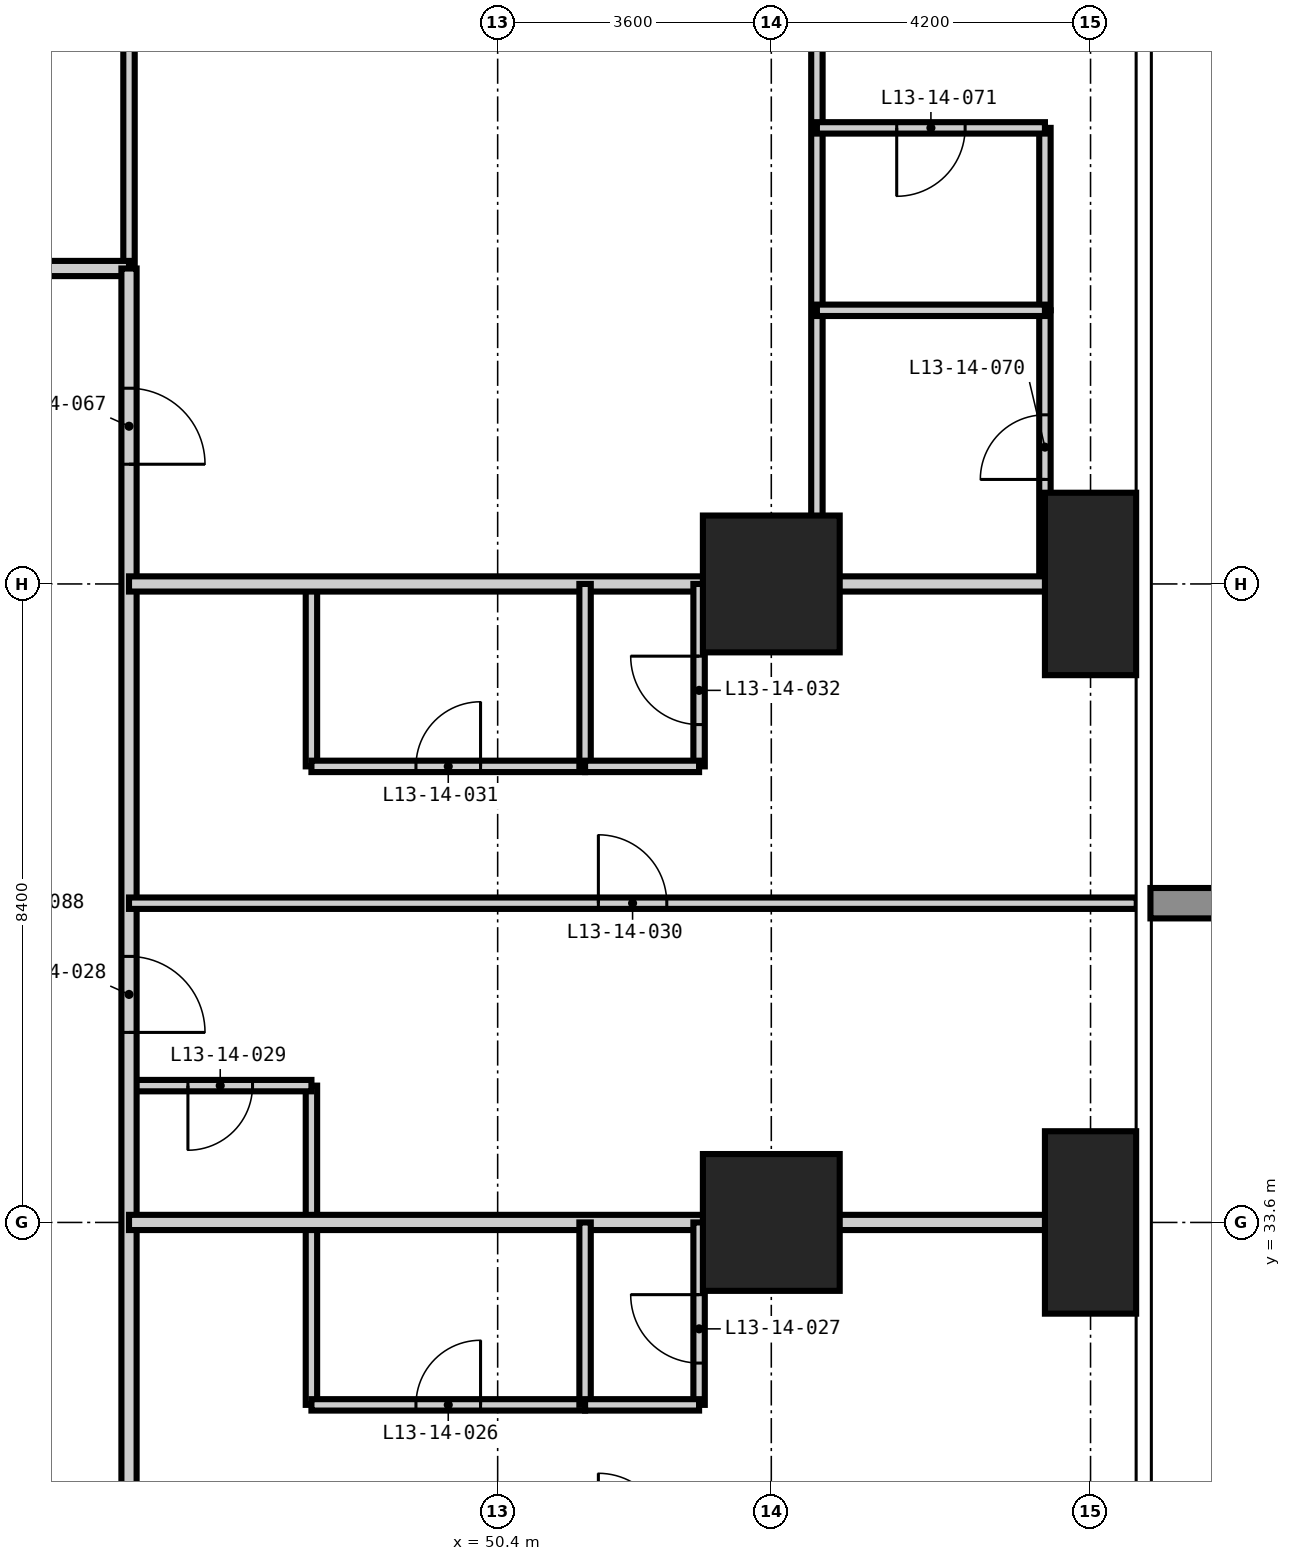
"""IFC4 building model, lengths in metres.
Left out: names, types, materials, properties, quantities, classifications, styles, units other than length and angle.
Written with IfcOpenShell. Run it as: python <this file> out.ifc"""

import sys

from ifc_helpers import new_model, si_unit, direction, frame, frame_2d, origin, origin_2d, place, context, subcontext, project, spatial, rectangle, extrude, element, fill, save


model = new_model("IFC4")
c1 = context("Model", 3, precision=1e-05, world=origin(), true_north=direction((0.0, 1.0)))
c2 = subcontext(c1, "Body", "Model", "MODEL_VIEW")
j1 = project(units=[si_unit("LENGTHUNIT", "METRE"), si_unit("PLANEANGLEUNIT", "RADIAN")], contexts=[c1])
p1 = place(None, origin())
s1 = spatial("IfcSite", under=j1, at=p1, CompositionType="ELEMENT")
p2 = place(p1, origin())
s2 = spatial("IfcBuilding", under=s1, at=p2, CompositionType="ELEMENT")
p3 = place(p2, frame((0.0, 0.0, 55.8)))
s3 = spatial("IfcBuildingStorey", under=s2, at=p3, CompositionType="ELEMENT", Elevation=55.8)
for number, where, z_axis, x_axis in (
    (1, (54.0, 33.6, -0.35), (0.0, 0.0, 1.0), (1.0, 0.0, 0.0)),
    (2, (54.0, 42.0, -0.35), (0.0, 0.0, 1.0), (1.0, 0.0, 0.0)),
):
    element("IfcColumn", number, at=place(p3, frame(where, z_axis=z_axis, x_axis=x_axis)), inside=s3, PredefinedType="COLUMN", context=c2, shape_type="SweptSolid", body=[
        extrude(rectangle(XDim=1.8, YDim=1.8, at=origin_2d()), origin(), (0.0, 0.0, 1.0), 3.6),
    ])
for number, where, z_axis, x_axis in (
    (3, (58.2, 33.6, -0.35), (0.0, 0.0, 1.0), (1.0, 0.0, 0.0)),
    (4, (58.2, 42.0, -0.35), (0.0, 0.0, 1.0), (1.0, 0.0, 0.0)),
):
    element("IfcColumn", number, at=place(p3, frame(where, z_axis=z_axis, x_axis=x_axis)), inside=s3, PredefinedType="COLUMN", context=c2, shape_type="SweptSolid", body=[
        extrude(rectangle(XDim=1.2, YDim=2.4, at=origin_2d()), origin(), (0.0, 0.0, 1.0), 3.6),
    ])
p4 = place(p3, frame((45.55, 46.15, 0.0), z_axis=(0.0, 0.0, 1.0), x_axis=(0.0, 1.0, 0.0)))
e5 = element("IfcWall", 5, at=p4, inside=s3, PredefinedType="PARTITIONING", context=c2, shape_type="SweptSolid", body=[
    extrude(rectangle(XDim=3.0, YDim=0.15, at=frame_2d((1.5, 0.0))), origin(), (0.0, 0.0, 1.0), 3.25),
])
p5 = place(p3, frame((47.95, 31.2, 0.0), z_axis=(0.0, 0.0, 1.0), x_axis=(0.0, 1.0, 0.0)))
e6 = element("IfcWall", 6, at=p5, inside=s3, PredefinedType="PARTITIONING", context=c2, shape_type="SweptSolid", body=[
    extrude(rectangle(XDim=4.2, YDim=0.15, at=frame_2d((2.1, 0.0))), origin(), (0.0, 0.0, 1.0), 3.25),
])
p6 = place(p3, frame((47.95, 39.6, 0.0), z_axis=(0.0, 0.0, 1.0), x_axis=(0.0, 1.0, 0.0)))
e7 = element("IfcWall", 7, at=p6, inside=s3, PredefinedType="PARTITIONING", context=c2, shape_type="SweptSolid", body=[
    extrude(rectangle(XDim=2.4, YDim=0.15, at=frame_2d((1.2, 0.0))), origin(), (0.0, 0.0, 1.0), 3.25),
])
p7 = place(p3, frame((57.6, 42.0, 0.0), z_axis=(0.0, 0.0, 1.0), x_axis=(0.0, 1.0, 0.0)))
e8 = element("IfcWall", 8, at=p7, inside=s3, PredefinedType="PARTITIONING", context=c2, shape_type="SweptSolid", body=[
    extrude(rectangle(XDim=3.6, YDim=0.15, at=frame_2d((1.8, 0.0))), origin(), (0.0, 0.0, 1.0), 3.25),
])
p8 = place(p7, frame((1.375, 0.0, 0.0)))
e9 = element("IfcOpeningElement", 9, at=p8, cuts=e8, PredefinedType="OPENING", context=c2, shape_type="SweptSolid", body=[
    extrude(rectangle(XDim=0.85, YDim=2.1, at=frame_2d((0.425, 1.05))), frame((0.0, 0.085, 0.0), z_axis=(0.0, -1.0, 0.0), x_axis=(1.0, 0.0, 0.0)), (0.0, 0.0, 1.0), 0.17),
])
p9 = place(p3, frame((47.95, 31.2, 0.0), z_axis=(0.0, 0.0, 1.0), x_axis=(1.0, 0.0, 0.0)))
e10 = element("IfcWall", 10, at=p9, inside=s3, PredefinedType="PARTITIONING", context=c2, shape_type="SweptSolid", body=[
    extrude(rectangle(XDim=3.6, YDim=0.15, at=frame_2d((1.8, 0.0))), origin(), (0.0, 0.0, 1.0), 3.25),
])
p10 = place(p9, frame((1.375, 0.0, 0.0)))
e11 = element("IfcOpeningElement", 11, at=p10, cuts=e10, PredefinedType="OPENING", context=c2, shape_type="SweptSolid", body=[
    extrude(rectangle(XDim=0.85, YDim=2.1, at=frame_2d((0.425, 1.05))), frame((0.0, 0.085, 0.0), z_axis=(0.0, -1.0, 0.0), x_axis=(1.0, 0.0, 0.0)), (0.0, 0.0, 1.0), 0.17),
])
p11 = place(p3, frame((45.55, 35.4, 0.0), z_axis=(0.0, 0.0, 1.0), x_axis=(1.0, 0.0, 0.0)))
e12 = element("IfcWall", 12, at=p11, inside=s3, PredefinedType="PARTITIONING", context=c2, shape_type="SweptSolid", body=[
    extrude(rectangle(XDim=2.4, YDim=0.15, at=frame_2d((1.2, 0.0))), origin(), (0.0, 0.0, 1.0), 3.25),
])
p12 = place(p11, frame((0.775, 0.0, 0.0)))
e13 = element("IfcOpeningElement", 13, at=p12, cuts=e12, PredefinedType="OPENING", context=c2, shape_type="SweptSolid", body=[
    extrude(rectangle(XDim=0.85, YDim=2.1, at=frame_2d((0.425, 1.05))), frame((0.0, 0.085, 0.0), z_axis=(0.0, -1.0, 0.0), x_axis=(1.0, 0.0, 0.0)), (0.0, 0.0, 1.0), 0.17),
])
p13 = place(p3, frame((47.95, 39.6, 0.0), z_axis=(0.0, 0.0, 1.0), x_axis=(1.0, 0.0, 0.0)))
e14 = element("IfcWall", 14, at=p13, inside=s3, PredefinedType="PARTITIONING", context=c2, shape_type="SweptSolid", body=[
    extrude(rectangle(XDim=3.6, YDim=0.15, at=frame_2d((1.8, 0.0))), origin(), (0.0, 0.0, 1.0), 3.25),
])
p14 = place(p13, frame((1.375, 0.0, 0.0)))
e15 = element("IfcOpeningElement", 15, at=p14, cuts=e14, PredefinedType="OPENING", context=c2, shape_type="SweptSolid", body=[
    extrude(rectangle(XDim=0.85, YDim=2.1, at=frame_2d((0.425, 1.05))), frame((0.0, 0.085, 0.0), z_axis=(0.0, -1.0, 0.0), x_axis=(1.0, 0.0, 0.0)), (0.0, 0.0, 1.0), 0.17),
])
p15 = place(p3, frame((13.85, 46.15, 0.0), z_axis=(0.0, 0.0, 1.0), x_axis=(1.0, 0.0, 0.0)))
e16 = element("IfcWall", 16, at=p15, inside=s3, PredefinedType="PARTITIONING", context=c2, shape_type="SweptSolid", body=[
    extrude(rectangle(XDim=31.7, YDim=0.2, at=frame_2d((15.85, 0.0))), origin(), (0.0, 0.0, 1.0), 3.25),
])
p16 = place(p15, frame((6.65, 0.0, 0.0)))
e17 = element("IfcOpeningElement", 17, at=p16, cuts=e16, PredefinedType="OPENING", context=c2, shape_type="SweptSolid", body=[
    extrude(rectangle(XDim=1.0, YDim=2.2, at=frame_2d((0.5, 1.1))), frame((0.0, 0.11, 0.0), z_axis=(0.0, -1.0, 0.0), x_axis=(1.0, 0.0, 0.0)), (0.0, 0.0, 1.0), 0.22),
])
p17 = place(p15, frame((15.05, 0.0, 0.0)))
e18 = element("IfcOpeningElement", 18, at=p17, cuts=e16, PredefinedType="OPENING", context=c2, shape_type="SweptSolid", body=[
    extrude(rectangle(XDim=1.0, YDim=2.2, at=frame_2d((0.5, 1.1))), frame((0.0, 0.11, 0.0), z_axis=(0.0, -1.0, 0.0), x_axis=(1.0, 0.0, 0.0)), (0.0, 0.0, 1.0), 0.22),
])
p18 = place(p15, frame((23.45, 0.0, 0.0)))
e19 = element("IfcOpeningElement", 19, at=p18, cuts=e16, PredefinedType="OPENING", context=c2, shape_type="SweptSolid", body=[
    extrude(rectangle(XDim=1.0, YDim=2.2, at=frame_2d((0.5, 1.1))), frame((0.0, 0.11, 0.0), z_axis=(0.0, -1.0, 0.0), x_axis=(1.0, 0.0, 0.0)), (0.0, 0.0, 1.0), 0.22),
])
p19 = place(p3, frame((45.55, 46.15, 0.0), z_axis=(0.0, 0.0, 1.0), x_axis=(0.0, -1.0, 0.0)))
e20 = element("IfcWall", 20, at=p19, inside=s3, PredefinedType="PARTITIONING", context=c2, shape_type="SweptSolid", body=[
    extrude(rectangle(XDim=32.3, YDim=0.2, at=frame_2d((16.15, 0.0))), origin(), (0.0, 0.0, 1.0), 3.25),
])
p20 = place(p19, frame((25.85, 0.0, 0.0)))
e21 = element("IfcOpeningElement", 21, at=p20, cuts=e20, PredefinedType="OPENING", context=c2, shape_type="SweptSolid", body=[
    extrude(rectangle(XDim=1.0, YDim=2.2, at=frame_2d((0.5, 1.1))), frame((0.0, 0.11, 0.0), z_axis=(0.0, -1.0, 0.0), x_axis=(1.0, 0.0, 0.0)), (0.0, 0.0, 1.0), 0.22),
])
p21 = place(p19, frame((17.45, 0.0, 0.0)))
e22 = element("IfcOpeningElement", 22, at=p21, cuts=e20, PredefinedType="OPENING", context=c2, shape_type="SweptSolid", body=[
    extrude(rectangle(XDim=1.0, YDim=2.2, at=frame_2d((0.5, 1.1))), frame((0.0, 0.11, 0.0), z_axis=(0.0, -1.0, 0.0), x_axis=(1.0, 0.0, 0.0)), (0.0, 0.0, 1.0), 0.22),
])
p22 = place(p19, frame((9.05, 0.0, 0.0)))
e23 = element("IfcOpeningElement", 23, at=p22, cuts=e20, PredefinedType="OPENING", context=c2, shape_type="SweptSolid", body=[
    extrude(rectangle(XDim=1.0, YDim=2.2, at=frame_2d((0.5, 1.1))), frame((0.0, 0.11, 0.0), z_axis=(0.0, -1.0, 0.0), x_axis=(1.0, 0.0, 0.0)), (0.0, 0.0, 1.0), 0.22),
])
p23 = place(p19, frame((30.325, 0.0, 0.0)))
e24 = element("IfcOpeningElement", 24, at=p23, cuts=e20, PredefinedType="OPENING", context=c2, shape_type="SweptSolid", body=[
    extrude(rectangle(XDim=1.0, YDim=2.2, at=frame_2d((0.5, 1.1))), frame((0.0, 0.11, 0.0), z_axis=(0.0, -1.0, 0.0), x_axis=(1.0, 0.0, 0.0)), (0.0, 0.0, 1.0), 0.22),
])
p24 = place(p19, frame((1.575, 0.0, 0.0)))
e25 = element("IfcOpeningElement", 25, at=p24, cuts=e20, PredefinedType="OPENING", context=c2, shape_type="SweptSolid", body=[
    extrude(rectangle(XDim=1.0, YDim=2.2, at=frame_2d((0.5, 1.1))), frame((0.0, 0.11, 0.0), z_axis=(0.0, -1.0, 0.0), x_axis=(1.0, 0.0, 0.0)), (0.0, 0.0, 1.0), 0.22),
])
for number, where, z_axis, x_axis in (
    (26, (45.55, 33.6, 0.0), (0.0, 0.0, 1.0), (1.0, 0.0, 0.0)),
    (27, (45.55, 42.0, 0.0), (0.0, 0.0, 1.0), (1.0, 0.0, 0.0)),
):
    element("IfcWall", number, at=place(p3, frame(where, z_axis=z_axis, x_axis=x_axis)), inside=s3, PredefinedType="PARTITIONING", context=c2, shape_type="SweptSolid", body=[
        extrude(rectangle(XDim=13.258, YDim=0.2, at=frame_2d((6.629, 0.0))), origin(), (0.0, 0.0, 1.0), 3.25),
    ])
p25 = place(p3, frame((51.55, 31.2, 0.0), z_axis=(0.0, 0.0, 1.0), x_axis=(0.0, 1.0, 0.0)))
e28 = element("IfcWall", 28, at=p25, inside=s3, PredefinedType="PARTITIONING", context=c2, shape_type="SweptSolid", body=[
    extrude(rectangle(XDim=2.4, YDim=0.15, at=frame_2d((1.2, 0.0))), origin(), (0.0, 0.0, 1.0), 3.25),
])
p26 = place(p3, frame((51.55, 39.6, 0.0), z_axis=(0.0, 0.0, 1.0), x_axis=(0.0, 1.0, 0.0)))
e29 = element("IfcWall", 29, at=p26, inside=s3, PredefinedType="PARTITIONING", context=c2, shape_type="SweptSolid", body=[
    extrude(rectangle(XDim=2.4, YDim=0.15, at=frame_2d((1.2, 0.0))), origin(), (0.0, 0.0, 1.0), 3.25),
])
p27 = place(p3, frame((53.05, 31.2, 0.0), z_axis=(0.0, 0.0, 1.0), x_axis=(0.0, 1.0, 0.0)))
e30 = element("IfcWall", 30, at=p27, inside=s3, PredefinedType="PARTITIONING", context=c2, shape_type="SweptSolid", body=[
    extrude(rectangle(XDim=2.4, YDim=0.15, at=frame_2d((1.2, 0.0))), origin(), (0.0, 0.0, 1.0), 3.25),
])
p28 = place(p27, frame((0.55, 0.0, 0.0)))
e31 = element("IfcOpeningElement", 31, at=p28, cuts=e30, PredefinedType="OPENING", context=c2, shape_type="SweptSolid", body=[
    extrude(rectangle(XDim=0.9, YDim=2.1, at=frame_2d((0.45, 1.05))), frame((0.0, 0.085, 0.0), z_axis=(0.0, -1.0, 0.0), x_axis=(1.0, 0.0, 0.0)), (0.0, 0.0, 1.0), 0.17),
])
p29 = place(p3, frame((53.05, 39.6, 0.0), z_axis=(0.0, 0.0, 1.0), x_axis=(0.0, 1.0, 0.0)))
e32 = element("IfcWall", 32, at=p29, inside=s3, PredefinedType="PARTITIONING", context=c2, shape_type="SweptSolid", body=[
    extrude(rectangle(XDim=2.4, YDim=0.15, at=frame_2d((1.2, 0.0))), origin(), (0.0, 0.0, 1.0), 3.25),
])
p30 = place(p29, frame((0.55, 0.0, 0.0)))
e33 = element("IfcOpeningElement", 33, at=p30, cuts=e32, PredefinedType="OPENING", context=c2, shape_type="SweptSolid", body=[
    extrude(rectangle(XDim=0.9, YDim=2.1, at=frame_2d((0.45, 1.05))), frame((0.0, 0.085, 0.0), z_axis=(0.0, -1.0, 0.0), x_axis=(1.0, 0.0, 0.0)), (0.0, 0.0, 1.0), 0.17),
])
p31 = place(p3, frame((54.6, 42.0, 0.0), z_axis=(0.0, 0.0, 1.0), x_axis=(0.0, 1.0, 0.0)))
e34 = element("IfcWall", 34, at=p31, inside=s3, PredefinedType="PARTITIONING", context=c2, shape_type="SweptSolid", body=[
    extrude(rectangle(XDim=16.808, YDim=0.15, at=frame_2d((8.404, 0.0))), origin(), (0.0, 0.0, 1.0), 3.25),
])
p32 = place(p31, frame((10.95, 0.0, 0.0)))
e35 = element("IfcOpeningElement", 35, at=p32, cuts=e34, PredefinedType="OPENING", context=c2, shape_type="SweptSolid", body=[
    extrude(rectangle(XDim=0.9, YDim=2.1, at=frame_2d((0.45, 1.05))), frame((0.0, 0.085, 0.0), z_axis=(0.0, -1.0, 0.0), x_axis=(1.0, 0.0, 0.0)), (0.0, 0.0, 1.0), 0.17),
])
p33 = place(p3, frame((57.6, 45.6, 0.0), z_axis=(0.0, 0.0, 1.0), x_axis=(0.0, 1.0, 0.0)))
e36 = element("IfcWall", 36, at=p33, inside=s3, PredefinedType="PARTITIONING", context=c2, shape_type="SweptSolid", body=[
    extrude(rectangle(XDim=2.4, YDim=0.15, at=frame_2d((1.2, 0.0))), origin(), (0.0, 0.0, 1.0), 3.25),
])
p34 = place(p3, frame((51.55, 31.2, 0.0), z_axis=(0.0, 0.0, 1.0), x_axis=(1.0, 0.0, 0.0)))
e37 = element("IfcWall", 37, at=p34, inside=s3, PredefinedType="PARTITIONING", context=c2, shape_type="SweptSolid", body=[
    extrude(rectangle(XDim=1.5, YDim=0.15, at=frame_2d((0.75, 0.0))), origin(), (0.0, 0.0, 1.0), 3.25),
])
p35 = place(p3, frame((45.55, 37.8, 0.0), z_axis=(0.0, 0.0, 1.0), x_axis=(1.0, 0.0, 0.0)))
e38 = element("IfcWall", 38, at=p35, inside=s3, PredefinedType="PARTITIONING", context=c2, shape_type="SweptSolid", body=[
    extrude(rectangle(XDim=13.258, YDim=0.15, at=frame_2d((6.629, 0.0))), origin(), (0.0, 0.0, 1.0), 3.25),
])
p36 = place(p35, frame((6.175, 0.0, 0.0)))
e39 = element("IfcOpeningElement", 39, at=p36, cuts=e38, PredefinedType="OPENING", context=c2, shape_type="SweptSolid", body=[
    extrude(rectangle(XDim=0.9, YDim=2.1, at=frame_2d((0.45, 1.05))), frame((0.0, 0.085, 0.0), z_axis=(0.0, -1.0, 0.0), x_axis=(1.0, 0.0, 0.0)), (0.0, 0.0, 1.0), 0.17),
])
p37 = place(p3, frame((51.55, 39.6, 0.0), z_axis=(0.0, 0.0, 1.0), x_axis=(1.0, 0.0, 0.0)))
e40 = element("IfcWall", 40, at=p37, inside=s3, PredefinedType="PARTITIONING", context=c2, shape_type="SweptSolid", body=[
    extrude(rectangle(XDim=1.5, YDim=0.15, at=frame_2d((0.75, 0.0))), origin(), (0.0, 0.0, 1.0), 3.25),
])
p38 = place(p3, frame((54.6, 45.6, 0.0), z_axis=(0.0, 0.0, 1.0), x_axis=(1.0, 0.0, 0.0)))
e41 = element("IfcWall", 41, at=p38, inside=s3, PredefinedType="PARTITIONING", context=c2, shape_type="SweptSolid", body=[
    extrude(rectangle(XDim=3.0, YDim=0.15, at=frame_2d((1.5, 0.0))), origin(), (0.0, 0.0, 1.0), 3.25),
])
p39 = place(p3, frame((54.6, 48.0, 0.0), z_axis=(0.0, 0.0, 1.0), x_axis=(1.0, 0.0, 0.0)))
e42 = element("IfcWall", 42, at=p39, inside=s3, PredefinedType="PARTITIONING", context=c2, shape_type="SweptSolid", body=[
    extrude(rectangle(XDim=3.0, YDim=0.15, at=frame_2d((1.5, 0.0))), origin(), (0.0, 0.0, 1.0), 3.25),
])
p40 = place(p39, frame((1.05, 0.0, 0.0)))
e43 = element("IfcOpeningElement", 43, at=p40, cuts=e42, PredefinedType="OPENING", context=c2, shape_type="SweptSolid", body=[
    extrude(rectangle(XDim=0.9, YDim=2.1, at=frame_2d((0.45, 1.05))), frame((0.0, 0.085, 0.0), z_axis=(0.0, -1.0, 0.0), x_axis=(1.0, 0.0, 0.0)), (0.0, 0.0, 1.0), 0.17),
])
p41 = place(p10, origin())
e44 = element("IfcDoor", 44, at=p41, inside=s3, OperationType="SINGLE_SWING_RIGHT", PredefinedType="DOOR", context=c2, shape_type="SweptSolid", body=[
    extrude(rectangle(XDim=0.85, YDim=2.1, at=frame_2d((0.425, 1.05))), frame((0.0, 0.025, 0.0), z_axis=(0.0, -1.0, 0.0), x_axis=(1.0, 0.0, 0.0)), (0.0, 0.0, 1.0), 0.05),
])
fill(e11, e44)
p42 = place(p28, origin())
e45 = element("IfcDoor", 45, at=p42, inside=s3, OperationType="SINGLE_SWING_RIGHT", PredefinedType="DOOR", context=c2, shape_type="SweptSolid", body=[
    extrude(rectangle(XDim=0.9, YDim=2.1, at=frame_2d((0.45, 1.05))), frame((0.0, 0.025, 0.0), z_axis=(0.0, -1.0, 0.0), x_axis=(1.0, 0.0, 0.0)), (0.0, 0.0, 1.0), 0.05),
])
fill(e31, e45)
p43 = place(p22, origin())
e46 = element("IfcDoor", 46, at=p43, inside=s3, OperationType="SINGLE_SWING_RIGHT", PredefinedType="DOOR", context=c2, shape_type="SweptSolid", body=[
    extrude(rectangle(XDim=1.0, YDim=2.2, at=frame_2d((0.5, 1.1))), frame((0.0, 0.025, 0.0), z_axis=(0.0, -1.0, 0.0), x_axis=(1.0, 0.0, 0.0)), (0.0, 0.0, 1.0), 0.05),
])
fill(e23, e46)
p44 = place(p12, frame((0.85, 0.0, 0.0), z_axis=(0.0, 0.0, 1.0), x_axis=(-1.0, 0.0, 0.0)))
e47 = element("IfcDoor", 47, at=p44, inside=s3, OperationType="SINGLE_SWING_RIGHT", PredefinedType="DOOR", context=c2, shape_type="SweptSolid", body=[
    extrude(rectangle(XDim=0.85, YDim=2.1, at=frame_2d((0.425, 1.05))), frame((0.0, 0.025, 0.0), z_axis=(0.0, -1.0, 0.0), x_axis=(1.0, 0.0, 0.0)), (0.0, 0.0, 1.0), 0.05),
])
fill(e13, e47)
p45 = place(p36, origin())
e48 = element("IfcDoor", 48, at=p45, inside=s3, OperationType="SINGLE_SWING_LEFT", PredefinedType="DOOR", context=c2, shape_type="SweptSolid", body=[
    extrude(rectangle(XDim=0.9, YDim=2.1, at=frame_2d((0.45, 1.05))), frame((0.0, 0.025, 0.0), z_axis=(0.0, -1.0, 0.0), x_axis=(1.0, 0.0, 0.0)), (0.0, 0.0, 1.0), 0.05),
])
fill(e39, e48)
p46 = place(p14, origin())
e49 = element("IfcDoor", 49, at=p46, inside=s3, OperationType="SINGLE_SWING_RIGHT", PredefinedType="DOOR", context=c2, shape_type="SweptSolid", body=[
    extrude(rectangle(XDim=0.85, YDim=2.1, at=frame_2d((0.425, 1.05))), frame((0.0, 0.025, 0.0), z_axis=(0.0, -1.0, 0.0), x_axis=(1.0, 0.0, 0.0)), (0.0, 0.0, 1.0), 0.05),
])
fill(e15, e49)
p47 = place(p30, origin())
e50 = element("IfcDoor", 50, at=p47, inside=s3, OperationType="SINGLE_SWING_RIGHT", PredefinedType="DOOR", context=c2, shape_type="SweptSolid", body=[
    extrude(rectangle(XDim=0.9, YDim=2.1, at=frame_2d((0.45, 1.05))), frame((0.0, 0.025, 0.0), z_axis=(0.0, -1.0, 0.0), x_axis=(1.0, 0.0, 0.0)), (0.0, 0.0, 1.0), 0.05),
])
fill(e33, e50)
p48 = place(p24, origin())
e51 = element("IfcDoor", 51, at=p48, inside=s3, OperationType="SINGLE_SWING_RIGHT", PredefinedType="DOOR", context=c2, shape_type="SweptSolid", body=[
    extrude(rectangle(XDim=1.0, YDim=2.2, at=frame_2d((0.5, 1.1))), frame((0.0, 0.025, 0.0), z_axis=(0.0, -1.0, 0.0), x_axis=(1.0, 0.0, 0.0)), (0.0, 0.0, 1.0), 0.05),
])
fill(e25, e51)
p49 = place(p8, origin())
e52 = element("IfcDoor", 52, at=p49, inside=s3, OperationType="SINGLE_SWING_LEFT", PredefinedType="DOOR", context=c2, shape_type="SweptSolid", body=[
    extrude(rectangle(XDim=0.85, YDim=2.1, at=frame_2d((0.425, 1.05))), frame((0.0, 0.025, 0.0), z_axis=(0.0, -1.0, 0.0), x_axis=(1.0, 0.0, 0.0)), (0.0, 0.0, 1.0), 0.05),
])
fill(e9, e52)
p50 = place(p40, frame((0.9, 0.0, 0.0), z_axis=(0.0, 0.0, 1.0), x_axis=(-1.0, 0.0, 0.0)))
e53 = element("IfcDoor", 53, at=p50, inside=s3, OperationType="SINGLE_SWING_RIGHT", PredefinedType="DOOR", context=c2, shape_type="SweptSolid", body=[
    extrude(rectangle(XDim=0.9, YDim=2.1, at=frame_2d((0.45, 1.05))), frame((0.0, 0.025, 0.0), z_axis=(0.0, -1.0, 0.0), x_axis=(1.0, 0.0, 0.0)), (0.0, 0.0, 1.0), 0.05),
])
fill(e43, e53)
save(model, sys.argv[1])
